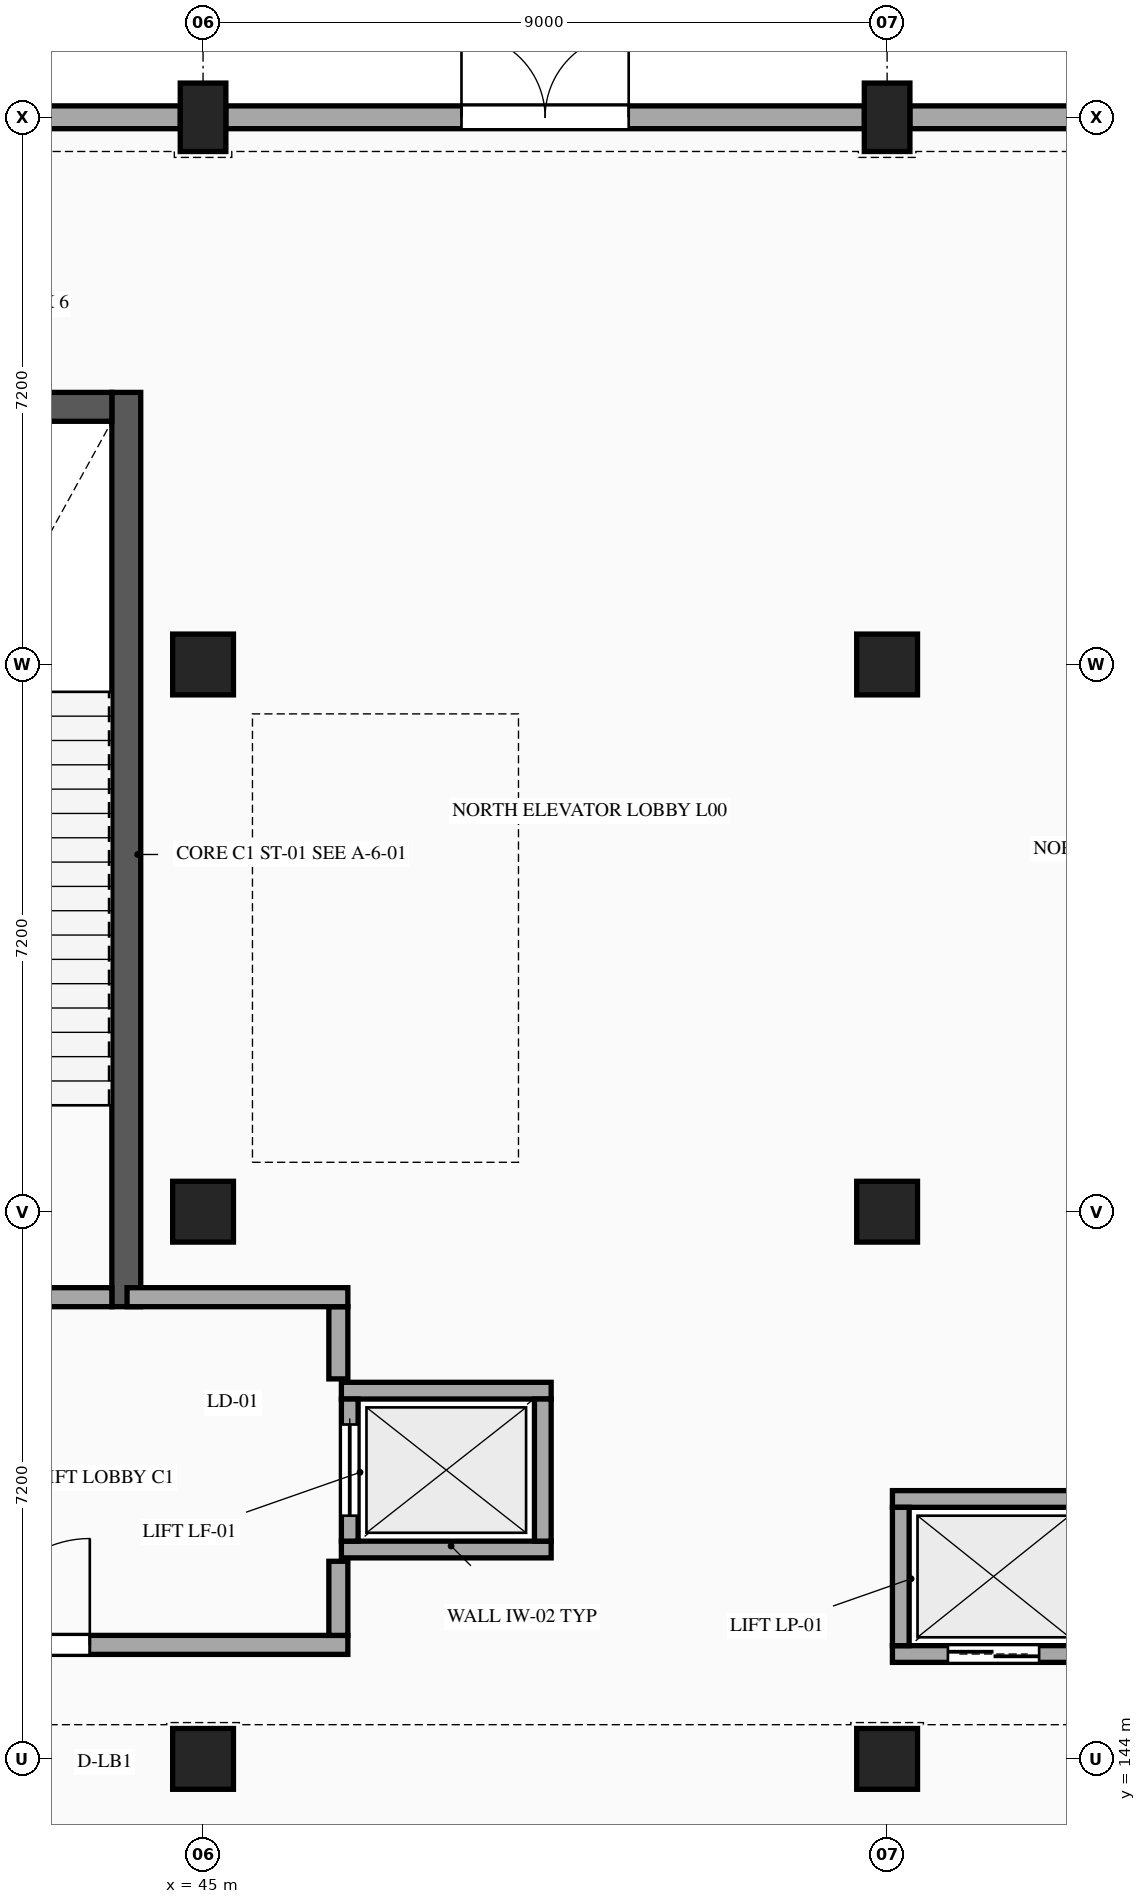
"""IFC4 building model, lengths in metres.
Left out: names, types, materials, properties, quantities, classifications, styles, units other than length and angle.
Written with IfcOpenShell. Run it as: python <this file> out.ifc"""

import sys

from ifc_helpers import new_model, si_unit, direction, frame, frame_2d, origin, origin_2d, place, context, subcontext, project, spatial, rectangle, extrude, element, fill, save


model = new_model("IFC4")
c1 = context("Model", 3, precision=1e-05, world=origin(), true_north=direction((0.0, 1.0)))
c2 = subcontext(c1, "Body", "Model", "MODEL_VIEW")
j1 = project(units=[si_unit("LENGTHUNIT", "METRE"), si_unit("PLANEANGLEUNIT", "RADIAN")], contexts=[c1])
p1 = place(None, origin())
s1 = spatial("IfcSite", under=j1, at=p1, CompositionType="ELEMENT")
p2 = place(p1, origin())
s2 = spatial("IfcBuilding", under=s1, at=p2, CompositionType="ELEMENT")
p3 = place(p2, origin())
s3 = spatial("IfcBuildingStorey", under=s2, at=p3, CompositionType="ELEMENT", Elevation=0.0)
for number, where, z_axis, x_axis in (
    (1, (45.0, 144.0, 0.0), (0.0, 0.0, 1.0), (1.0, 0.0, 0.0)),
    (2, (45.0, 151.2, 0.0), (0.0, 0.0, 1.0), (1.0, 0.0, 0.0)),
    (3, (45.0, 158.4, 0.0), (0.0, 0.0, 1.0), (1.0, 0.0, 0.0)),
):
    element("IfcColumn", number, at=place(p3, frame(where, z_axis=z_axis, x_axis=x_axis)), inside=s3, PredefinedType="COLUMN", context=c2, shape_type="SweptSolid", body=[
        extrude(rectangle(XDim=0.8, YDim=0.8, at=origin_2d()), origin(), (0.0, 0.0, 1.0), 5.4),
    ])
p4 = place(p3, frame((45.0, 165.6, 0.0), z_axis=(0.0, 0.0, 1.0), x_axis=(1.0, 0.0, 0.0)))
e4 = element("IfcColumn", 4, at=p4, inside=s3, PredefinedType="COLUMN", context=c2, shape_type="SweptSolid", body=[
    extrude(rectangle(XDim=0.6, YDim=0.9, at=origin_2d()), origin(), (0.0, 0.0, 1.0), 5.4),
])
for number, where, z_axis, x_axis in (
    (5, (54.0, 144.0, 0.0), (0.0, 0.0, 1.0), (1.0, 0.0, 0.0)),
    (6, (54.0, 151.2, 0.0), (0.0, 0.0, 1.0), (1.0, 0.0, 0.0)),
    (7, (54.0, 158.4, 0.0), (0.0, 0.0, 1.0), (1.0, 0.0, 0.0)),
):
    element("IfcColumn", number, at=place(p3, frame(where, z_axis=z_axis, x_axis=x_axis)), inside=s3, PredefinedType="COLUMN", context=c2, shape_type="SweptSolid", body=[
        extrude(rectangle(XDim=0.8, YDim=0.8, at=origin_2d()), origin(), (0.0, 0.0, 1.0), 5.4),
    ])
p5 = place(p3, frame((54.0, 165.6, 0.0), z_axis=(0.0, 0.0, 1.0), x_axis=(1.0, 0.0, 0.0)))
e8 = element("IfcColumn", 8, at=p5, inside=s3, PredefinedType="COLUMN", context=c2, shape_type="SweptSolid", body=[
    extrude(rectangle(XDim=0.6, YDim=0.9, at=origin_2d()), origin(), (0.0, 0.0, 1.0), 5.4),
])
p6 = place(p3, frame((43.99, 161.98, 0.0), z_axis=(0.0, 0.0, 1.0), x_axis=(0.0, -1.0, 0.0)))
e9 = element("IfcWall", 9, at=p6, inside=s3, PredefinedType="SHEAR", context=c2, shape_type="SweptSolid", body=[
    extrude(rectangle(XDim=12.03, YDim=0.38, at=frame_2d((6.015, 0.0))), origin(), (0.0, 0.0, 1.0), 5.12),
])
p7 = place(p3, frame((38.84, 161.79, 0.0), z_axis=(0.0, 0.0, 1.0), x_axis=(1.0, 0.0, 0.0)))
e10 = element("IfcWall", 10, at=p7, inside=s3, PredefinedType="SHEAR", context=c2, shape_type="SweptSolid", body=[
    extrude(rectangle(XDim=4.96, YDim=0.38, at=frame_2d((2.48, 0.0))), origin(), (0.0, 0.0, 1.0), 5.12),
])
p8 = place(p3, frame((36.298, 165.6, 0.0), z_axis=(0.0, 0.0, 1.0), x_axis=(1.0, 0.0, 0.0)))
e11 = element("IfcWall", 11, at=p8, inside=s3, PredefinedType="STANDARD", context=c2, shape_type="SweptSolid", body=[
    extrude(rectangle(XDim=8.404, YDim=0.3, at=frame_2d((4.202, 0.0))), origin(), (0.0, 0.0, 1.0), 4.747),
])
p9 = place(p8, frame((3.102, 0.0, 0.0)))
e12 = element("IfcOpeningElement", 12, at=p9, cuts=e11, PredefinedType="OPENING", context=c2, shape_type="SweptSolid", body=[
    extrude(rectangle(XDim=2.2, YDim=2.4, at=frame_2d((1.1, 1.2))), frame((0.0, 0.16, 0.0), z_axis=(0.0, -1.0, 0.0), x_axis=(1.0, 0.0, 0.0)), (0.0, 0.0, 1.0), 0.32),
])
p10 = place(p3, frame((45.298, 165.6, 0.0), z_axis=(0.0, 0.0, 1.0), x_axis=(1.0, 0.0, 0.0)))
e13 = element("IfcWall", 13, at=p10, inside=s3, PredefinedType="STANDARD", context=c2, shape_type="SweptSolid", body=[
    extrude(rectangle(XDim=8.404, YDim=0.3, at=frame_2d((4.202, 0.0))), origin(), (0.0, 0.0, 1.0), 4.653),
])
p11 = place(p10, frame((3.102, 0.0, 0.0)))
e14 = element("IfcOpeningElement", 14, at=p11, cuts=e13, PredefinedType="OPENING", context=c2, shape_type="SweptSolid", body=[
    extrude(rectangle(XDim=2.2, YDim=2.4, at=frame_2d((1.1, 1.2))), frame((0.0, 0.16, 0.0), z_axis=(0.0, -1.0, 0.0), x_axis=(1.0, 0.0, 0.0)), (0.0, 0.0, 1.0), 0.32),
])
p12 = place(p3, frame((54.298, 165.6, 0.0), z_axis=(0.0, 0.0, 1.0), x_axis=(1.0, 0.0, 0.0)))
e15 = element("IfcWall", 15, at=p12, inside=s3, PredefinedType="STANDARD", context=c2, shape_type="SweptSolid", body=[
    extrude(rectangle(XDim=8.404, YDim=0.3, at=frame_2d((4.202, 0.0))), origin(), (0.0, 0.0, 1.0), 4.663),
])
p13 = place(p12, frame((3.102, 0.0, 0.0)))
e16 = element("IfcOpeningElement", 16, at=p13, cuts=e15, PredefinedType="OPENING", context=c2, shape_type="SweptSolid", body=[
    extrude(rectangle(XDim=2.2, YDim=2.4, at=frame_2d((1.1, 1.2))), frame((0.0, 0.16, 0.0), z_axis=(0.0, -1.0, 0.0), x_axis=(1.0, 0.0, 0.0)), (0.0, 0.0, 1.0), 0.32),
])
p14 = place(p3, frame((43.8, 150.075, 0.0), z_axis=(0.0, 0.0, 1.0), x_axis=(-1.0, 0.0, 0.0)))
e17 = element("IfcWall", 17, at=p14, inside=s3, PredefinedType="STANDARD", context=c2, shape_type="SweptSolid", body=[
    extrude(rectangle(XDim=4.96, YDim=0.25, at=frame_2d((2.48, 0.0))), origin(), (0.0, 0.0, 1.0), 5.08),
])
p15 = place(p14, frame((1.905, 0.0, 0.0)))
e18 = element("IfcOpeningElement", 18, at=p15, cuts=e17, PredefinedType="OPENING", context=c2, shape_type="SweptSolid", body=[
    extrude(rectangle(XDim=1.15, YDim=2.2, at=frame_2d((0.575, 1.1))), frame((0.0, 0.135, 0.0), z_axis=(0.0, -1.0, 0.0), x_axis=(1.0, 0.0, 0.0)), (0.0, 0.0, 1.0), 0.27),
])
for number, where, z_axis, x_axis in (
    (19, (46.82, 146.755, 0.0), (0.0, 0.0, 1.0), (1.0, 0.0, 0.0)),
    (20, (49.58, 148.845, 0.0), (0.0, 0.0, 1.0), (-1.0, 0.0, 0.0)),
):
    element("IfcWall", number, at=place(p3, frame(where, z_axis=z_axis, x_axis=x_axis)), inside=s3, PredefinedType="STANDARD", context=c2, shape_type="SweptSolid", body=[
        extrude(rectangle(XDim=2.76, YDim=0.22, at=frame_2d((1.38, 0.0))), origin(), (0.0, 0.0, 1.0), 5.08),
    ])
p16 = place(p3, frame((46.93, 148.735, 0.0), z_axis=(0.0, 0.0, 1.0), x_axis=(0.0, -1.0, 0.0)))
e21 = element("IfcWall", 21, at=p16, inside=s3, PredefinedType="STANDARD", context=c2, shape_type="SweptSolid", body=[
    extrude(rectangle(XDim=1.87, YDim=0.22, at=frame_2d((0.935, 0.0))), origin(), (0.0, 0.0, 1.0), 5.08),
])
p17 = place(p16, frame((0.335, 0.0, 0.0)))
e22 = element("IfcOpeningElement", 22, at=p17, cuts=e21, PredefinedType="OPENING", context=c2, shape_type="SweptSolid", body=[
    extrude(rectangle(XDim=1.2, YDim=2.2, at=frame_2d((0.6, 1.1))), frame((0.0, 0.12, 0.0), z_axis=(0.0, -1.0, 0.0), x_axis=(1.0, 0.0, 0.0)), (0.0, 0.0, 1.0), 0.24),
])
p18 = place(p3, frame((49.47, 146.865, 0.0), z_axis=(0.0, 0.0, 1.0), x_axis=(0.0, 1.0, 0.0)))
e23 = element("IfcWall", 23, at=p18, inside=s3, PredefinedType="STANDARD", context=c2, shape_type="SweptSolid", body=[
    extrude(rectangle(XDim=1.87, YDim=0.22, at=frame_2d((0.935, 0.0))), origin(), (0.0, 0.0, 1.0), 5.08),
])
p19 = place(p3, frame((54.07, 145.38, 0.0), z_axis=(0.0, 0.0, 1.0), x_axis=(1.0, 0.0, 0.0)))
e24 = element("IfcWall", 24, at=p19, inside=s3, PredefinedType="STANDARD", context=c2, shape_type="SweptSolid", body=[
    extrude(rectangle(XDim=2.66, YDim=0.22, at=frame_2d((1.33, 0.0))), origin(), (0.0, 0.0, 1.0), 4.437),
])
p20 = place(p19, frame((0.73, 0.0, 0.0)))
e25 = element("IfcOpeningElement", 25, at=p20, cuts=e24, PredefinedType="OPENING", context=c2, shape_type="SweptSolid", body=[
    extrude(rectangle(XDim=1.2, YDim=2.2, at=frame_2d((0.6, 1.1))), frame((0.0, 0.12, 0.0), z_axis=(0.0, -1.0, 0.0), x_axis=(1.0, 0.0, 0.0)), (0.0, 0.0, 1.0), 0.24),
])
p21 = place(p3, frame((56.73, 147.42, 0.0), z_axis=(0.0, 0.0, 1.0), x_axis=(-1.0, 0.0, 0.0)))
e26 = element("IfcWall", 26, at=p21, inside=s3, PredefinedType="STANDARD", context=c2, shape_type="SweptSolid", body=[
    extrude(rectangle(XDim=2.66, YDim=0.22, at=frame_2d((1.33, 0.0))), origin(), (0.0, 0.0, 1.0), 4.437),
])
p22 = place(p3, frame((54.18, 147.31, 0.0), z_axis=(0.0, 0.0, 1.0), x_axis=(0.0, -1.0, 0.0)))
e27 = element("IfcWall", 27, at=p22, inside=s3, PredefinedType="STANDARD", context=c2, shape_type="SweptSolid", body=[
    extrude(rectangle(XDim=1.82, YDim=0.22, at=frame_2d((0.91, 0.0))), origin(), (0.0, 0.0, 1.0), 4.437),
])
p23 = place(p3, frame((38.715, 145.5, 0.0), z_axis=(0.0, 0.0, 1.0), x_axis=(1.0, 0.0, 0.0)))
e28 = element("IfcWall", 28, at=p23, inside=s3, PredefinedType="STANDARD", context=c2, shape_type="SweptSolid", body=[
    extrude(rectangle(XDim=8.19, YDim=0.25, at=frame_2d((4.095, 0.0))), origin(), (0.0, 0.0, 1.0), 4.437),
])
p24 = place(p23, frame((3.395, 0.0, 0.0)))
e29 = element("IfcOpeningElement", 29, at=p24, cuts=e28, PredefinedType="OPENING", context=c2, shape_type="SweptSolid", body=[
    extrude(rectangle(XDim=1.4, YDim=2.2, at=frame_2d((0.7, 1.1))), frame((0.0, 0.135, 0.0), z_axis=(0.0, -1.0, 0.0), x_axis=(1.0, 0.0, 0.0)), (0.0, 0.0, 1.0), 0.27),
])
p25 = place(p3, frame((46.78, 145.625, 0.0), z_axis=(0.0, 0.0, 1.0), x_axis=(0.0, 1.0, 0.0)))
e30 = element("IfcWall", 30, at=p25, inside=s3, PredefinedType="STANDARD", context=c2, shape_type="SweptSolid", body=[
    extrude(rectangle(XDim=0.975, YDim=0.25, at=frame_2d((0.488, 0.0))), origin(), (0.0, 0.0, 1.0), 4.437),
])
p26 = place(p3, frame((46.78, 149.0, 0.0), z_axis=(0.0, 0.0, 1.0), x_axis=(0.0, 1.0, 0.0)))
e31 = element("IfcWall", 31, at=p26, inside=s3, PredefinedType="STANDARD", context=c2, shape_type="SweptSolid", body=[
    extrude(rectangle(XDim=0.95, YDim=0.25, at=frame_2d((0.475, 0.0))), origin(), (0.0, 0.0, 1.0), 4.437),
])
p27 = place(p3, frame((44.0, 150.075, 0.0), z_axis=(0.0, 0.0, 1.0), x_axis=(1.0, 0.0, 0.0)))
e32 = element("IfcWall", 32, at=p27, inside=s3, PredefinedType="STANDARD", context=c2, shape_type="SweptSolid", body=[
    extrude(rectangle(XDim=2.905, YDim=0.25, at=frame_2d((1.453, 0.0))), origin(), (0.0, 0.0, 1.0), 4.437),
])
p28 = place(p11, origin())
e33 = element("IfcDoor", 33, at=p28, inside=s3, OperationType="DOUBLE_DOOR_SINGLE_SWING", PredefinedType="DOOR", context=c2, shape_type="SweptSolid", body=[
    extrude(rectangle(XDim=2.2, YDim=2.4, at=frame_2d((1.1, 1.2))), frame((0.0, 0.025, 0.0), z_axis=(0.0, -1.0, 0.0), x_axis=(1.0, 0.0, 0.0)), (0.0, 0.0, 1.0), 0.05),
])
fill(e14, e33)
p29 = place(p17, origin())
e34 = element("IfcDoor", 34, at=p29, inside=s3, OperationType="DOUBLE_DOOR_SLIDING", PredefinedType="DOOR", context=c2, shape_type="SweptSolid", body=[
    extrude(rectangle(XDim=1.2, YDim=2.2, at=frame_2d((0.6, 1.1))), frame((0.0, 0.025, 0.0), z_axis=(0.0, -1.0, 0.0), x_axis=(1.0, 0.0, 0.0)), (0.0, 0.0, 1.0), 0.05),
])
fill(e22, e34)
p30 = place(p20, origin())
e35 = element("IfcDoor", 35, at=p30, inside=s3, OperationType="DOUBLE_DOOR_SLIDING", PredefinedType="DOOR", context=c2, shape_type="SweptSolid", body=[
    extrude(rectangle(XDim=1.2, YDim=2.2, at=frame_2d((0.6, 1.1))), frame((0.0, 0.025, 0.0), z_axis=(0.0, -1.0, 0.0), x_axis=(1.0, 0.0, 0.0)), (0.0, 0.0, 1.0), 0.05),
])
fill(e25, e35)
p31 = place(p24, origin())
e36 = element("IfcDoor", 36, at=p31, inside=s3, OperationType="SINGLE_SWING_RIGHT", PredefinedType="DOOR", context=c2, shape_type="SweptSolid", body=[
    extrude(rectangle(XDim=1.4, YDim=2.2, at=frame_2d((0.7, 1.1))), frame((0.0, 0.025, 0.0), z_axis=(0.0, -1.0, 0.0), x_axis=(1.0, 0.0, 0.0)), (0.0, 0.0, 1.0), 0.05),
])
fill(e29, e36)
save(model, sys.argv[1])
